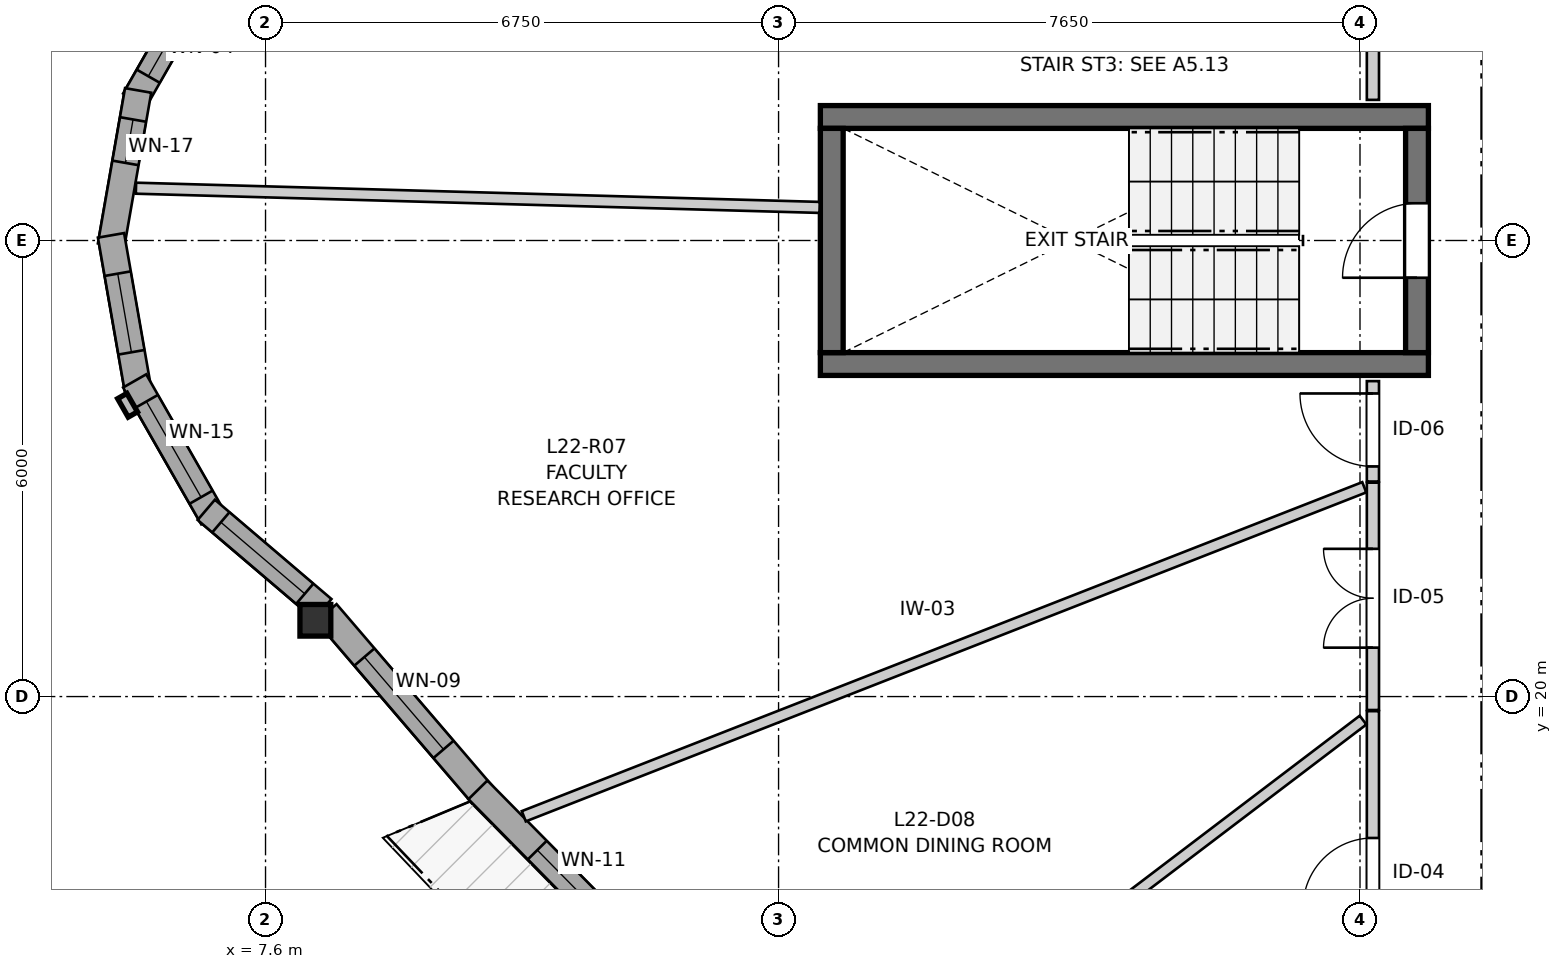
"""IFC4 building model, lengths in metres.
Left out: names, types, materials, properties, quantities, classifications, styles, units other than length and angle.
Written with IfcOpenShell. Run it as: python <this file> out.ifc"""

import sys

from ifc_helpers import new_model, si_unit, direction, frame, frame_2d, origin, origin_2d, place, context, subcontext, project, spatial, rectangle, i_section, extrude, source, transform, mapped, element, fill, save


model = new_model("IFC4")
c1 = context("Model", 3, precision=1e-05, world=origin(), true_north=direction((0.0, 1.0)))
c2 = subcontext(c1, "Body", "Model", "MODEL_VIEW")
j1 = project(units=[si_unit("LENGTHUNIT", "METRE"), si_unit("PLANEANGLEUNIT", "RADIAN")], contexts=[c1])
p1 = place(None, origin())
s1 = spatial("IfcSite", under=j1, at=p1, CompositionType="ELEMENT")
p2 = place(p1, origin())
s2 = spatial("IfcBuilding", under=s1, at=p2, CompositionType="ELEMENT")
p3 = place(p2, frame((0.0, 0.0, 76.8)))
s3 = spatial("IfcBuildingStorey", under=s2, at=p3, CompositionType="ELEMENT", Elevation=76.8)
for number, where, z_axis, x_axis in (
    (1, (14.9, 24.375, 0.0), (0.0, 0.0, 1.0), (1.0, 0.0, 0.0)),
    (2, (22.9, 27.625, 0.0), (0.0, 0.0, 1.0), (-1.0, 0.0, 0.0)),
):
    element("IfcWall", number, at=place(p3, frame(where, z_axis=z_axis, x_axis=x_axis)), inside=s3, PredefinedType="SHEAR", context=c2, shape_type="SweptSolid", body=[
        extrude(rectangle(XDim=8.0, YDim=0.3, at=frame_2d((4.0, 0.0))), origin(), (0.0, 0.0, 1.0), 2.935),
    ])
p4 = place(p3, frame((15.05, 27.475, 0.0), z_axis=(0.0, 0.0, 1.0), x_axis=(0.0, -1.0, 0.0)))
e3 = element("IfcWall", 3, at=p4, inside=s3, PredefinedType="SHEAR", context=c2, shape_type="SweptSolid", body=[
    extrude(rectangle(XDim=2.95, YDim=0.3, at=frame_2d((1.475, 0.0))), origin(), (0.0, 0.0, 1.0), 2.935),
])
p5 = place(p3, frame((22.75, 24.525, 0.0), z_axis=(0.0, 0.0, 1.0), x_axis=(0.0, 1.0, 0.0)))
e4 = element("IfcWall", 4, at=p5, inside=s3, PredefinedType="SHEAR", context=c2, shape_type="SweptSolid", body=[
    extrude(rectangle(XDim=2.95, YDim=0.3, at=frame_2d((1.475, 0.0))), origin(), (0.0, 0.0, 1.0), 2.935),
])
p6 = place(p5, frame((0.985, 0.0, 0.0)))
e5 = element("IfcOpeningElement", 5, at=p6, cuts=e4, PredefinedType="OPENING", context=c2, shape_type="SweptSolid", body=[
    extrude(rectangle(XDim=0.98, YDim=2.15, at=frame_2d((0.49, 1.075))), frame((0.0, 0.16, 0.0), z_axis=(0.0, -1.0, 0.0), x_axis=(1.0, 0.0, 0.0)), (0.0, 0.0, 1.0), 0.32),
])
m1 = source(origin(), c2, "Body", "SweptSolid", [
    extrude(i_section(OverallWidth=0.406, OverallDepth=0.416, WebThickness=0.027, FlangeThickness=0.044, FilletRadius=0.015, at=origin_2d()), origin(), (0.0, 0.0, 1.0), 2.935),
])
p7 = place(p3, frame((8.256, 21.003, 0.0), z_axis=(0.0, 0.0, 1.0), x_axis=(1.0, 0.0, 0.0)))
e6 = element("IfcColumn", 6, at=p7, inside=s3, PredefinedType="PILASTER", context=c2, shape_type="MappedRepresentation", body=[
    mapped(m1, transform((0.0, 0.0, 0.0), x_axis=(1.0, 0.0, 0.0), y_axis=(0.0, 1.0, 0.0), z_axis=(0.0, 0.0, 1.0), scale=1.0)),
])
p8 = place(p3, frame((6.906, 29.647, 0.0), z_axis=(0.0, 0.0, 1.0), x_axis=(-0.496037473582, -0.868301114132, 0.0)))
e7 = element("IfcWall", 7, at=p8, inside=s3, PredefinedType="SOLIDWALL", context=c2, shape_type="SweptSolid", body=[
    extrude(rectangle(XDim=2.073, YDim=0.35, at=frame_2d((1.037, 0.0))), origin(), (0.0, 0.0, 1.0), 2.465),
])
p9 = place(p8, frame((0.362, 0.0, 0.82)))
e8 = element("IfcOpeningElement", 8, at=p9, cuts=e7, PredefinedType="OPENING", context=c2, shape_type="SweptSolid", body=[
    extrude(rectangle(XDim=1.35, YDim=1.45, at=frame_2d((0.675, 0.725))), frame((0.0, 0.185, 0.0), z_axis=(0.0, -1.0, 0.0), x_axis=(1.0, 0.0, 0.0)), (0.0, 0.0, 1.0), 0.37),
])
p10 = place(p3, frame((5.924, 27.975, 0.0), z_axis=(0.0, 0.0, 1.0), x_axis=(-0.172166087538, -0.985067935881, 0.0)))
e9 = element("IfcWall", 9, at=p10, inside=s3, PredefinedType="SOLIDWALL", context=c2, shape_type="SweptSolid", body=[
    extrude(rectangle(XDim=2.073, YDim=0.35, at=frame_2d((1.037, 0.0))), origin(), (0.0, 0.0, 1.0), 2.465),
])
p11 = place(p10, frame((0.388, 0.0, 0.82)))
e10 = element("IfcOpeningElement", 10, at=p11, cuts=e9, PredefinedType="OPENING", context=c2, shape_type="SweptSolid", body=[
    extrude(rectangle(XDim=0.58, YDim=1.35, at=frame_2d((0.29, 0.675))), frame((0.0, 0.185, 0.0), z_axis=(0.0, -1.0, 0.0), x_axis=(1.0, 0.0, 0.0)), (0.0, 0.0, 1.0), 0.37),
])
p12 = place(p3, frame((5.567, 26.068, 0.0), z_axis=(0.0, 0.0, 1.0), x_axis=(0.172166087538, -0.985067935881, 0.0)))
e11 = element("IfcWall", 11, at=p12, inside=s3, PredefinedType="SOLIDWALL", context=c2, shape_type="SweptSolid", body=[
    extrude(rectangle(XDim=2.073, YDim=0.35, at=frame_2d((1.037, 0.0))), origin(), (0.0, 0.0, 1.0), 2.465),
])
p13 = place(p12, frame((0.511, 0.0, 0.82)))
e12 = element("IfcOpeningElement", 12, at=p13, cuts=e11, PredefinedType="OPENING", context=c2, shape_type="SweptSolid", body=[
    extrude(rectangle(XDim=1.05, YDim=1.45, at=frame_2d((0.525, 0.725))), frame((0.0, 0.185, 0.0), z_axis=(0.0, -1.0, 0.0), x_axis=(1.0, 0.0, 0.0)), (0.0, 0.0, 1.0), 0.37),
])
p14 = place(p3, frame((5.878, 24.153, 0.0), z_axis=(0.0, 0.0, 1.0), x_axis=(0.496037473582, -0.868301114132, 0.0)))
e13 = element("IfcWall", 13, at=p14, inside=s3, PredefinedType="SOLIDWALL", context=c2, shape_type="SweptSolid", body=[
    extrude(rectangle(XDim=2.073, YDim=0.35, at=frame_2d((1.037, 0.0))), origin(), (0.0, 0.0, 1.0), 2.465),
])
p15 = place(p14, frame((0.312, 0.0, 0.82)))
e14 = element("IfcOpeningElement", 14, at=p15, cuts=e13, PredefinedType="OPENING", context=c2, shape_type="SweptSolid", body=[
    extrude(rectangle(XDim=1.45, YDim=1.25, at=frame_2d((0.725, 0.625))), frame((0.0, 0.185, 0.0), z_axis=(0.0, -1.0, 0.0), x_axis=(1.0, 0.0, 0.0)), (0.0, 0.0, 1.0), 0.37),
])
p16 = place(p3, frame((6.82, 22.457, 0.0), z_axis=(0.0, 0.0, 1.0), x_axis=(0.76114353683, -0.648583469063, 0.0)))
e15 = element("IfcWall", 15, at=p16, inside=s3, PredefinedType="SOLIDWALL", context=c2, shape_type="SweptSolid", body=[
    extrude(rectangle(XDim=2.015, YDim=0.35, at=frame_2d((1.007, 0.0))), origin(), (0.0, 0.0, 1.0), 2.465),
])
p17 = place(p16, frame((0.252, 0.0, 0.82)))
e16 = element("IfcOpeningElement", 16, at=p17, cuts=e15, PredefinedType="OPENING", context=c2, shape_type="SweptSolid", body=[
    extrude(rectangle(XDim=1.45, YDim=1.25, at=frame_2d((0.725, 0.625))), frame((0.0, 0.185, 0.0), z_axis=(0.0, -1.0, 0.0), x_axis=(1.0, 0.0, 0.0)), (0.0, 0.0, 1.0), 0.37),
])
p18 = place(p3, frame((8.402, 21.102, 0.0), z_axis=(0.0, 0.0, 1.0), x_axis=(0.650797748491, -0.759251138004, 0.0)))
e17 = element("IfcWall", 17, at=p18, inside=s3, PredefinedType="SOLIDWALL", context=c2, shape_type="SweptSolid", body=[
    extrude(rectangle(XDim=3.154, YDim=0.35, at=frame_2d((1.577, 0.0))), origin(), (0.0, 0.0, 1.0), 2.465),
])
p19 = place(p18, frame((0.767, 0.0, 0.82)))
e18 = element("IfcOpeningElement", 18, at=p19, cuts=e17, PredefinedType="OPENING", context=c2, shape_type="SweptSolid", body=[
    extrude(rectangle(XDim=1.6, YDim=1.35, at=frame_2d((0.8, 0.675))), frame((0.0, 0.185, 0.0), z_axis=(0.0, -1.0, 0.0), x_axis=(1.0, 0.0, 0.0)), (0.0, 0.0, 1.0), 0.37),
])
p20 = place(p3, frame((10.394, 18.773, 0.0), z_axis=(0.0, 0.0, 1.0), x_axis=(0.701965316192, -0.712211130819, 0.0)))
e19 = element("IfcWall", 19, at=p20, inside=s3, PredefinedType="SOLIDWALL", context=c2, shape_type="SweptSolid", body=[
    extrude(rectangle(XDim=2.883, YDim=0.35, at=frame_2d((1.442, 0.0))), origin(), (0.0, 0.0, 1.0), 2.465),
])
p21 = place(p20, frame((1.113, 0.0, 0.82)))
e20 = element("IfcOpeningElement", 20, at=p21, cuts=e19, PredefinedType="OPENING", context=c2, shape_type="SweptSolid", body=[
    extrude(rectangle(XDim=1.25, YDim=1.35, at=frame_2d((0.625, 0.675))), frame((0.0, 0.185, 0.0), z_axis=(0.0, -1.0, 0.0), x_axis=(1.0, 0.0, 0.0)), (0.0, 0.0, 1.0), 0.37),
])
p22 = place(p3, frame((22.17, 15.57, 0.0), z_axis=(0.0, 0.0, 1.0), x_axis=(0.0, 1.0, 0.0)))
e21 = element("IfcWall", 21, at=p22, inside=s3, PredefinedType="PARTITIONING", context=c2, shape_type="SweptSolid", body=[
    extrude(rectangle(XDim=4.238, YDim=0.16, at=frame_2d((2.119, 0.0))), origin(), (0.0, 0.0, 1.0), 2.935),
])
p23 = place(p22, frame((1.649, 0.0, 0.0)))
e22 = element("IfcOpeningElement", 22, at=p23, cuts=e21, PredefinedType="OPENING", context=c2, shape_type="SweptSolid", body=[
    extrude(rectangle(XDim=0.92, YDim=2.1, at=frame_2d((0.46, 1.05))), frame((0.0, 0.09, 0.0), z_axis=(0.0, -1.0, 0.0), x_axis=(1.0, 0.0, 0.0)), (0.0, 0.0, 1.0), 0.18),
])
p24 = place(p3, frame((22.17, 27.85, 0.0), z_axis=(0.0, 0.0, 1.0), x_axis=(0.0, 1.0, 0.0)))
e23 = element("IfcWall", 23, at=p24, inside=s3, PredefinedType="PARTITIONING", context=c2, shape_type="SweptSolid", body=[
    extrude(rectangle(XDim=3.745, YDim=0.16, at=frame_2d((1.873, 0.0))), origin(), (0.0, 0.0, 1.0), 2.935),
])
p25 = place(p24, frame((1.438, 0.0, 0.0)))
e24 = element("IfcOpeningElement", 24, at=p25, cuts=e23, PredefinedType="OPENING", context=c2, shape_type="SweptSolid", body=[
    extrude(rectangle(XDim=0.96, YDim=2.1, at=frame_2d((0.48, 1.05))), frame((0.0, 0.09, 0.0), z_axis=(0.0, -1.0, 0.0), x_axis=(1.0, 0.0, 0.0)), (0.0, 0.0, 1.0), 0.18),
])
p26 = place(p3, frame((22.17, 19.823, 0.0), z_axis=(0.0, 0.0, 1.0), x_axis=(0.0, 1.0, 0.0)))
e25 = element("IfcWall", 25, at=p26, inside=s3, PredefinedType="PARTITIONING", context=c2, shape_type="SweptSolid", body=[
    extrude(rectangle(XDim=2.991, YDim=0.16, at=frame_2d((1.496, 0.0))), origin(), (0.0, 0.0, 1.0), 2.935),
])
p27 = place(p26, frame((0.821, 0.0, 0.0)))
e26 = element("IfcOpeningElement", 26, at=p27, cuts=e25, PredefinedType="OPENING", context=c2, shape_type="SweptSolid", body=[
    extrude(rectangle(XDim=1.3, YDim=2.1, at=frame_2d((0.65, 1.05))), frame((0.0, 0.09, 0.0), z_axis=(0.0, -1.0, 0.0), x_axis=(1.0, 0.0, 0.0)), (0.0, 0.0, 1.0), 0.18),
])
p28 = place(p3, frame((22.17, 22.829, 0.0), z_axis=(0.0, 0.0, 1.0), x_axis=(0.0, 1.0, 0.0)))
e27 = element("IfcWall", 27, at=p28, inside=s3, PredefinedType="PARTITIONING", context=c2, shape_type="SweptSolid", body=[
    extrude(rectangle(XDim=1.321, YDim=0.16, at=frame_2d((0.66, 0.0))), origin(), (0.0, 0.0, 1.0), 2.935),
])
p29 = place(p28, frame((0.198, 0.0, 0.0)))
e28 = element("IfcOpeningElement", 28, at=p29, cuts=e27, PredefinedType="OPENING", context=c2, shape_type="SweptSolid", body=[
    extrude(rectangle(XDim=0.96, YDim=2.1, at=frame_2d((0.48, 1.05))), frame((0.0, 0.09, 0.0), z_axis=(0.0, -1.0, 0.0), x_axis=(1.0, 0.0, 0.0)), (0.0, 0.0, 1.0), 0.18),
])
p30 = place(p3, frame((10.998, 18.425, 0.0), z_axis=(0.0, 0.0, 1.0), x_axis=(0.931213049878, 0.364475315676, 0.0)))
e29 = element("IfcWall", 29, at=p30, inside=s3, PredefinedType="PARTITIONING", context=c2, shape_type="SweptSolid", body=[
    extrude(rectangle(XDim=11.875, YDim=0.145, at=frame_2d((5.938, 0.0))), origin(), (0.0, 0.0, 1.0), 2.935),
])
p31 = place(p3, frame((5.896, 26.688, 0.0), z_axis=(0.0, 0.0, 1.0), x_axis=(0.999604843423, -0.028109731489, 0.0)))
e30 = element("IfcWall", 30, at=p31, inside=s3, PredefinedType="PARTITIONING", context=c2, shape_type="SweptSolid", body=[
    extrude(rectangle(XDim=8.998, YDim=0.145, at=frame_2d((4.499, 0.0))), origin(), (0.0, 0.0, 1.0), 2.935),
])
p32 = place(p3, frame((15.239, 14.526, 0.0), z_axis=(0.0, 0.0, 1.0), x_axis=(0.796393529077, 0.604778758592, 0.0)))
e31 = element("IfcWall", 31, at=p32, inside=s3, PredefinedType="PARTITIONING", context=c2, shape_type="SweptSolid", body=[
    extrude(rectangle(XDim=8.539, YDim=0.145, at=frame_2d((4.27, 0.0))), origin(), (0.0, 0.0, 1.0), 2.935),
])
m2 = source(origin(), c2, "Body", "SweptSolid", [
    extrude(rectangle(XDim=1.35, YDim=1.45, at=frame_2d((0.675, 0.725))), frame((0.0, 0.03, 0.0), z_axis=(0.0, -1.0, 0.0), x_axis=(1.0, 0.0, 0.0)), (0.0, 0.0, 1.0), 0.06),
])
p33 = place(p9, origin())
e32 = element("IfcWindow", 32, at=p33, inside=s3, PartitioningType="SINGLE_PANEL", PredefinedType="WINDOW", context=c2, shape_type="MappedRepresentation", body=[
    mapped(m2, transform((0.0, 0.0, 0.0), x_axis=(1.0, 0.0, 0.0), y_axis=(0.0, 1.0, 0.0), z_axis=(0.0, 0.0, 1.0), scale=1.0)),
])
fill(e8, e32)
m3 = source(origin(), c2, "Body", "SweptSolid", [
    extrude(rectangle(XDim=0.58, YDim=1.35, at=frame_2d((0.29, 0.675))), frame((0.0, 0.03, 0.0), z_axis=(0.0, -1.0, 0.0), x_axis=(1.0, 0.0, 0.0)), (0.0, 0.0, 1.0), 0.06),
])
p34 = place(p11, origin())
e33 = element("IfcWindow", 33, at=p34, inside=s3, PartitioningType="SINGLE_PANEL", PredefinedType="WINDOW", context=c2, shape_type="MappedRepresentation", body=[
    mapped(m3, transform((0.0, 0.0, 0.0), x_axis=(1.0, 0.0, 0.0), y_axis=(0.0, 1.0, 0.0), z_axis=(0.0, 0.0, 1.0), scale=1.0)),
])
fill(e10, e33)
m4 = source(origin(), c2, "Body", "SweptSolid", [
    extrude(rectangle(XDim=1.05, YDim=1.45, at=frame_2d((0.525, 0.725))), frame((0.0, 0.03, 0.0), z_axis=(0.0, -1.0, 0.0), x_axis=(1.0, 0.0, 0.0)), (0.0, 0.0, 1.0), 0.06),
])
p35 = place(p13, origin())
e34 = element("IfcWindow", 34, at=p35, inside=s3, PartitioningType="SINGLE_PANEL", PredefinedType="WINDOW", context=c2, shape_type="MappedRepresentation", body=[
    mapped(m4, transform((0.0, 0.0, 0.0), x_axis=(1.0, 0.0, 0.0), y_axis=(0.0, 1.0, 0.0), z_axis=(0.0, 0.0, 1.0), scale=1.0)),
])
fill(e12, e34)
m5 = source(origin(), c2, "Body", "SweptSolid", [
    extrude(rectangle(XDim=1.45, YDim=1.25, at=frame_2d((0.725, 0.625))), frame((0.0, 0.03, 0.0), z_axis=(0.0, -1.0, 0.0), x_axis=(1.0, 0.0, 0.0)), (0.0, 0.0, 1.0), 0.06),
])
p36 = place(p15, origin())
e35 = element("IfcWindow", 35, at=p36, inside=s3, PartitioningType="SINGLE_PANEL", PredefinedType="WINDOW", context=c2, shape_type="MappedRepresentation", body=[
    mapped(m5, transform((0.0, 0.0, 0.0), x_axis=(1.0, 0.0, 0.0), y_axis=(0.0, 1.0, 0.0), z_axis=(0.0, 0.0, 1.0), scale=1.0)),
])
fill(e14, e35)
p37 = place(p17, origin())
e36 = element("IfcWindow", 36, at=p37, inside=s3, PartitioningType="SINGLE_PANEL", PredefinedType="WINDOW", context=c2, shape_type="MappedRepresentation", body=[
    mapped(m5, transform((0.0, 0.0, 0.0), x_axis=(1.0, 0.0, 0.0), y_axis=(0.0, 1.0, 0.0), z_axis=(0.0, 0.0, 1.0), scale=1.0)),
])
fill(e16, e36)
m6 = source(origin(), c2, "Body", "SweptSolid", [
    extrude(rectangle(XDim=1.6, YDim=1.35, at=frame_2d((0.8, 0.675))), frame((0.0, 0.03, 0.0), z_axis=(0.0, -1.0, 0.0), x_axis=(1.0, 0.0, 0.0)), (0.0, 0.0, 1.0), 0.06),
])
p38 = place(p19, origin())
e37 = element("IfcWindow", 37, at=p38, inside=s3, PartitioningType="SINGLE_PANEL", PredefinedType="WINDOW", context=c2, shape_type="MappedRepresentation", body=[
    mapped(m6, transform((0.0, 0.0, 0.0), x_axis=(1.0, 0.0, 0.0), y_axis=(0.0, 1.0, 0.0), z_axis=(0.0, 0.0, 1.0), scale=1.0)),
])
fill(e18, e37)
m7 = source(origin(), c2, "Body", "SweptSolid", [
    extrude(rectangle(XDim=1.25, YDim=1.35, at=frame_2d((0.625, 0.675))), frame((0.0, 0.03, 0.0), z_axis=(0.0, -1.0, 0.0), x_axis=(1.0, 0.0, 0.0)), (0.0, 0.0, 1.0), 0.06),
])
p39 = place(p21, origin())
e38 = element("IfcWindow", 38, at=p39, inside=s3, PartitioningType="SINGLE_PANEL", PredefinedType="WINDOW", context=c2, shape_type="MappedRepresentation", body=[
    mapped(m7, transform((0.0, 0.0, 0.0), x_axis=(1.0, 0.0, 0.0), y_axis=(0.0, 1.0, 0.0), z_axis=(0.0, 0.0, 1.0), scale=1.0)),
])
fill(e20, e38)
m8 = source(origin(), c2, "Body", "SweptSolid", [
    extrude(rectangle(XDim=0.98, YDim=2.15, at=frame_2d((0.49, 1.075))), frame((0.0, 0.025, 0.0), z_axis=(0.0, -1.0, 0.0), x_axis=(1.0, 0.0, 0.0)), (0.0, 0.0, 1.0), 0.05),
])
p40 = place(p6, origin())
e39 = element("IfcDoor", 39, at=p40, inside=s3, OperationType="SINGLE_SWING_LEFT", PredefinedType="DOOR", context=c2, shape_type="MappedRepresentation", body=[
    mapped(m8, transform((0.0, 0.0, 0.0), x_axis=(1.0, 0.0, 0.0), y_axis=(0.0, 1.0, 0.0), z_axis=(0.0, 0.0, 1.0), scale=1.0)),
])
fill(e5, e39)
m9 = source(origin(), c2, "Body", "SweptSolid", [
    extrude(rectangle(XDim=0.92, YDim=2.1, at=frame_2d((0.46, 1.05))), frame((0.0, 0.025, 0.0), z_axis=(0.0, -1.0, 0.0), x_axis=(1.0, 0.0, 0.0)), (0.0, 0.0, 1.0), 0.05),
])
p41 = place(p23, origin())
e40 = element("IfcDoor", 40, at=p41, inside=s3, OperationType="SINGLE_SWING_LEFT", PredefinedType="DOOR", context=c2, shape_type="MappedRepresentation", body=[
    mapped(m9, transform((0.0, 0.0, 0.0), x_axis=(1.0, 0.0, 0.0), y_axis=(0.0, 1.0, 0.0), z_axis=(0.0, 0.0, 1.0), scale=1.0)),
])
fill(e22, e40)
m10 = source(origin(), c2, "Body", "SweptSolid", [
    extrude(rectangle(XDim=1.3, YDim=2.1, at=frame_2d((0.65, 1.05))), frame((0.0, 0.025, 0.0), z_axis=(0.0, -1.0, 0.0), x_axis=(1.0, 0.0, 0.0)), (0.0, 0.0, 1.0), 0.05),
])
p42 = place(p27, origin())
e41 = element("IfcDoor", 41, at=p42, inside=s3, OperationType="DOUBLE_DOOR_SINGLE_SWING", PredefinedType="DOOR", context=c2, shape_type="MappedRepresentation", body=[
    mapped(m10, transform((0.0, 0.0, 0.0), x_axis=(1.0, 0.0, 0.0), y_axis=(0.0, 1.0, 0.0), z_axis=(0.0, 0.0, 1.0), scale=1.0)),
])
fill(e26, e41)
m11 = source(origin(), c2, "Body", "SweptSolid", [
    extrude(rectangle(XDim=0.96, YDim=2.1, at=frame_2d((0.48, 1.05))), frame((0.0, 0.025, 0.0), z_axis=(0.0, -1.0, 0.0), x_axis=(1.0, 0.0, 0.0)), (0.0, 0.0, 1.0), 0.05),
])
p43 = place(p29, origin())
e42 = element("IfcDoor", 42, at=p43, inside=s3, OperationType="SINGLE_SWING_RIGHT", PredefinedType="DOOR", context=c2, shape_type="MappedRepresentation", body=[
    mapped(m11, transform((0.0, 0.0, 0.0), x_axis=(1.0, 0.0, 0.0), y_axis=(0.0, 1.0, 0.0), z_axis=(0.0, 0.0, 1.0), scale=1.0)),
])
fill(e28, e42)
save(model, sys.argv[1])
